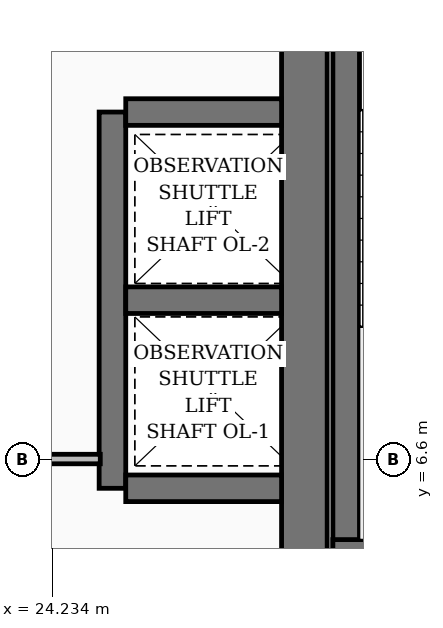
"""IFC4 building model, lengths in metres.
Left out: names, types, materials, properties, quantities, classifications, styles, units other than length and angle.
Written with IfcOpenShell. Run it as: python <this file> out.ifc"""

import sys

from ifc_helpers import new_model, si_unit, direction, frame, frame_2d, origin, place, context, subcontext, project, spatial, rectangle, extrude, element, save


model = new_model("IFC4")
c1 = context("Model", 3, precision=1e-05, world=origin(), true_north=direction((0.0, 1.0)))
c2 = subcontext(c1, "Body", "Model", "MODEL_VIEW")
j1 = project(units=[si_unit("LENGTHUNIT", "METRE"), si_unit("PLANEANGLEUNIT", "RADIAN")], contexts=[c1])
p1 = place(None, origin())
s1 = spatial("IfcSite", under=j1, at=p1, CompositionType="ELEMENT")
p2 = place(p1, origin())
s2 = spatial("IfcBuilding", under=s1, at=p2, CompositionType="ELEMENT")
p3 = place(p2, frame((0.0, 0.0, 285.75)))
s3 = spatial("IfcBuildingStorey", under=s2, at=p3, CompositionType="ELEMENT", Elevation=285.75)
p4 = place(p3, frame((27.55, 5.075, 0.0), z_axis=(0.0, 0.0, 1.0), x_axis=(0.0, 1.0, 0.0)))
e1 = element("IfcWall", 1, at=p4, inside=s3, PredefinedType="SHEAR", context=c2, shape_type="SweptSolid", body=[
    extrude(rectangle(XDim=9.15, YDim=0.6, at=frame_2d((4.575, 0.0))), origin(), (0.0, 0.0, 1.0), 3.75),
])
p5 = place(p3, frame((28.1, 5.2, 0.0), z_axis=(0.0, 0.0, 1.0), x_axis=(0.0, 1.0, 0.0)))
e2 = element("IfcWall", 2, at=p5, inside=s3, PredefinedType="SOLIDWALL", context=c2, shape_type="SweptSolid", body=[
    extrude(rectangle(XDim=9.25, YDim=0.35, at=frame_2d((4.625, 0.0))), origin(), (0.0, 0.0, 1.0), 3.75),
])
p6 = place(p3, frame((27.925, 5.375, 0.0), z_axis=(0.0, 0.0, 1.0), x_axis=(1.0, 0.0, 0.0)))
e3 = element("IfcWall", 3, at=p6, inside=s3, PredefinedType="SOLIDWALL", context=c2, shape_type="SweptSolid", body=[
    extrude(rectangle(XDim=3.55, YDim=0.35, at=frame_2d((1.775, 0.0))), origin(), (0.0, 0.0, 1.0), 3.75),
])
p7 = place(p3, frame((25.025, 6.225, 0.0), z_axis=(0.0, 0.0, 1.0), x_axis=(0.0, 1.0, 0.0)))
e4 = element("IfcWall", 4, at=p7, inside=s3, PredefinedType="SOLIDWALL", context=c2, shape_type="SweptSolid", body=[
    extrude(rectangle(XDim=4.95, YDim=0.35, at=frame_2d((2.475, 0.0))), origin(), (0.0, 0.0, 1.0), 3.75),
])
for number, where, z_axis, x_axis in (
    (5, (25.2, 6.225, 0.0), (0.0, 0.0, 1.0), (1.0, 0.0, 0.0)),
    (6, (25.2, 8.7, 0.0), (0.0, 0.0, 1.0), (1.0, 0.0, 0.0)),
    (7, (25.2, 11.175, 0.0), (0.0, 0.0, 1.0), (1.0, 0.0, 0.0)),
):
    element("IfcWall", number, at=place(p3, frame(where, z_axis=z_axis, x_axis=x_axis)), inside=s3, PredefinedType="SOLIDWALL", context=c2, shape_type="SweptSolid", body=[
        extrude(rectangle(XDim=2.05, YDim=0.35, at=frame_2d((1.025, 0.0))), origin(), (0.0, 0.0, 1.0), 3.75),
    ])
p8 = place(p3, frame((24.865, 6.61, 0.0), z_axis=(0.0, 0.0, 1.0), x_axis=(-1.0, 0.0, 0.0)))
e8 = element("IfcWall", 8, at=p8, inside=s3, PredefinedType="PARTITIONING", context=c2, shape_type="SweptSolid", body=[
    extrude(rectangle(XDim=2.905, YDim=0.125, at=frame_2d((1.453, 0.0))), origin(), (0.0, 0.0, 1.0), 2.641),
])
save(model, sys.argv[1])
